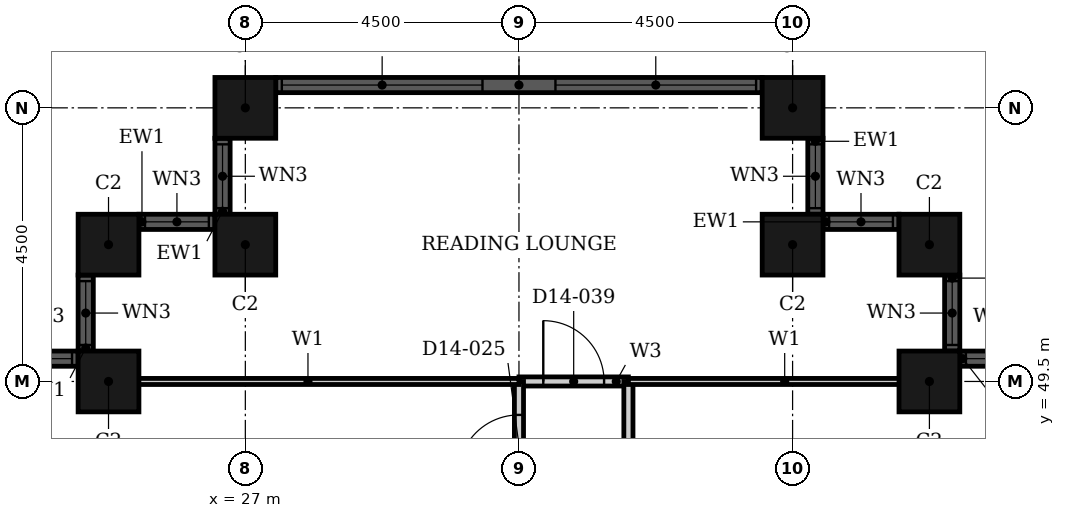
"""IFC4 building model, lengths in metres.
Left out: names, types, materials, properties, quantities, classifications, styles, units other than length and angle.
Written with IfcOpenShell. Run it as: python <this file> out.ifc"""

import sys

from ifc_helpers import new_model, si_unit, direction, frame, frame_2d, origin, origin_2d, place, context, subcontext, project, spatial, rectangle, hollow_rectangle, extrude, element, fill, save


model = new_model("IFC4")
c1 = context("Model", 3, precision=1e-05, world=origin(), true_north=direction((0.0, 1.0)))
c2 = subcontext(c1, "Body", "Model", "MODEL_VIEW")
j1 = project(units=[si_unit("LENGTHUNIT", "METRE"), si_unit("PLANEANGLEUNIT", "RADIAN")], contexts=[c1])
p1 = place(None, origin())
s1 = spatial("IfcSite", under=j1, at=p1, CompositionType="ELEMENT")
p2 = place(p1, origin())
s2 = spatial("IfcBuilding", under=s1, at=p2, CompositionType="ELEMENT")
p3 = place(p2, frame((0.0, 0.0, 63.6)))
s3 = spatial("IfcBuildingStorey", under=s2, at=p3, CompositionType="ELEMENT", Elevation=63.6)
for number, where, z_axis, x_axis in (
    (1, (38.25, 49.5, 0.0), (0.0, 0.0, 1.0), (1.0, 0.0, 0.0)),
    (2, (38.25, 51.75, 0.0), (0.0, 0.0, 1.0), (1.0, 0.0, 0.0)),
    (3, (36.0, 51.75, 0.0), (0.0, 0.0, 1.0), (1.0, 0.0, 0.0)),
    (4, (36.0, 54.0, 0.0), (0.0, 0.0, 1.0), (1.0, 0.0, 0.0)),
    (5, (27.0, 54.0, 0.0), (0.0, 0.0, 1.0), (1.0, 0.0, 0.0)),
    (6, (27.0, 51.75, 0.0), (0.0, 0.0, 1.0), (1.0, 0.0, 0.0)),
    (7, (24.75, 51.75, 0.0), (0.0, 0.0, 1.0), (1.0, 0.0, 0.0)),
    (8, (24.75, 49.5, 0.0), (0.0, 0.0, 1.0), (1.0, 0.0, 0.0)),
):
    element("IfcColumn", number, at=place(p3, frame(where, z_axis=z_axis, x_axis=x_axis)), inside=s3, PredefinedType="COLUMN", context=c2, shape_type="SweptSolid", body=[
        extrude(hollow_rectangle(XDim=1.0, YDim=1.0, WallThickness=0.032, at=origin_2d()), origin(), (0.0, 0.0, 1.0), 3.6),
    ])
p4 = place(p3, frame((40.0, 49.875, 0.0), z_axis=(0.0, 0.0, 1.0), x_axis=(-1.0, 0.0, 0.0)))
e9 = element("IfcWall", 9, at=p4, inside=s3, PredefinedType="SOLIDWALL", context=c2, shape_type="SweptSolid", body=[
    extrude(rectangle(XDim=1.25, YDim=0.25, at=frame_2d((0.625, 0.0))), origin(), (0.0, 0.0, 1.0), 3.6),
])
p5 = place(p4, frame((0.1, 0.0, 0.9)))
e10 = element("IfcOpeningElement", 10, at=p5, cuts=e9, PredefinedType="OPENING", context=c2, shape_type="SweptSolid", body=[
    extrude(rectangle(XDim=1.05, YDim=2.08, at=frame_2d((0.525, 1.04))), frame((0.0, 0.135, 0.0), z_axis=(0.0, -1.0, 0.0), x_axis=(1.0, 0.0, 0.0)), (0.0, 0.0, 1.0), 0.27),
])
p6 = place(p3, frame((38.625, 50.0, 0.0), z_axis=(0.0, 0.0, 1.0), x_axis=(0.0, 1.0, 0.0)))
e11 = element("IfcWall", 11, at=p6, inside=s3, PredefinedType="SOLIDWALL", context=c2, shape_type="SweptSolid", body=[
    extrude(rectangle(XDim=1.25, YDim=0.25, at=frame_2d((0.625, 0.0))), origin(), (0.0, 0.0, 1.0), 3.6),
])
p7 = place(p6, frame((0.1, 0.0, 0.9)))
e12 = element("IfcOpeningElement", 12, at=p7, cuts=e11, PredefinedType="OPENING", context=c2, shape_type="SweptSolid", body=[
    extrude(rectangle(XDim=1.05, YDim=2.08, at=frame_2d((0.525, 1.04))), frame((0.0, 0.135, 0.0), z_axis=(0.0, -1.0, 0.0), x_axis=(1.0, 0.0, 0.0)), (0.0, 0.0, 1.0), 0.27),
])
p8 = place(p3, frame((37.75, 52.125, 0.0), z_axis=(0.0, 0.0, 1.0), x_axis=(-1.0, 0.0, 0.0)))
e13 = element("IfcWall", 13, at=p8, inside=s3, PredefinedType="SOLIDWALL", context=c2, shape_type="SweptSolid", body=[
    extrude(rectangle(XDim=1.25, YDim=0.25, at=frame_2d((0.625, 0.0))), origin(), (0.0, 0.0, 1.0), 3.6),
])
p9 = place(p8, frame((0.1, 0.0, 0.9)))
e14 = element("IfcOpeningElement", 14, at=p9, cuts=e13, PredefinedType="OPENING", context=c2, shape_type="SweptSolid", body=[
    extrude(rectangle(XDim=1.05, YDim=2.08, at=frame_2d((0.525, 1.04))), frame((0.0, 0.135, 0.0), z_axis=(0.0, -1.0, 0.0), x_axis=(1.0, 0.0, 0.0)), (0.0, 0.0, 1.0), 0.27),
])
p10 = place(p3, frame((36.375, 52.25, 0.0), z_axis=(0.0, 0.0, 1.0), x_axis=(0.0, 1.0, 0.0)))
e15 = element("IfcWall", 15, at=p10, inside=s3, PredefinedType="SOLIDWALL", context=c2, shape_type="SweptSolid", body=[
    extrude(rectangle(XDim=1.25, YDim=0.25, at=frame_2d((0.625, 0.0))), origin(), (0.0, 0.0, 1.0), 3.6),
])
p11 = place(p10, frame((0.1, 0.0, 0.9)))
e16 = element("IfcOpeningElement", 16, at=p11, cuts=e15, PredefinedType="OPENING", context=c2, shape_type="SweptSolid", body=[
    extrude(rectangle(XDim=1.05, YDim=2.08, at=frame_2d((0.525, 1.04))), frame((0.0, 0.135, 0.0), z_axis=(0.0, -1.0, 0.0), x_axis=(1.0, 0.0, 0.0)), (0.0, 0.0, 1.0), 0.27),
])
p12 = place(p3, frame((35.5, 54.375, 0.0), z_axis=(0.0, 0.0, 1.0), x_axis=(-1.0, 0.0, 0.0)))
e17 = element("IfcWall", 17, at=p12, inside=s3, PredefinedType="SOLIDWALL", context=c2, shape_type="SweptSolid", body=[
    extrude(rectangle(XDim=8.0, YDim=0.25, at=frame_2d((4.0, 0.0))), origin(), (0.0, 0.0, 1.0), 3.6),
])
p13 = place(p12, frame((0.1, 0.0, 0.9)))
e18 = element("IfcOpeningElement", 18, at=p13, cuts=e17, PredefinedType="OPENING", context=c2, shape_type="SweptSolid", body=[
    extrude(rectangle(XDim=3.3, YDim=2.08, at=frame_2d((1.65, 1.04))), frame((0.0, 0.135, 0.0), z_axis=(0.0, -1.0, 0.0), x_axis=(1.0, 0.0, 0.0)), (0.0, 0.0, 1.0), 0.27),
])
p14 = place(p12, frame((4.6, 0.0, 0.9)))
e19 = element("IfcOpeningElement", 19, at=p14, cuts=e17, PredefinedType="OPENING", context=c2, shape_type="SweptSolid", body=[
    extrude(rectangle(XDim=3.3, YDim=2.08, at=frame_2d((1.65, 1.04))), frame((0.0, 0.135, 0.0), z_axis=(0.0, -1.0, 0.0), x_axis=(1.0, 0.0, 0.0)), (0.0, 0.0, 1.0), 0.27),
])
p15 = place(p3, frame((26.625, 53.5, 0.0), z_axis=(0.0, 0.0, 1.0), x_axis=(0.0, -1.0, 0.0)))
e20 = element("IfcWall", 20, at=p15, inside=s3, PredefinedType="SOLIDWALL", context=c2, shape_type="SweptSolid", body=[
    extrude(rectangle(XDim=1.25, YDim=0.25, at=frame_2d((0.625, 0.0))), origin(), (0.0, 0.0, 1.0), 3.6),
])
p16 = place(p15, frame((0.1, 0.0, 0.9)))
e21 = element("IfcOpeningElement", 21, at=p16, cuts=e20, PredefinedType="OPENING", context=c2, shape_type="SweptSolid", body=[
    extrude(rectangle(XDim=1.05, YDim=2.08, at=frame_2d((0.525, 1.04))), frame((0.0, 0.135, 0.0), z_axis=(0.0, -1.0, 0.0), x_axis=(1.0, 0.0, 0.0)), (0.0, 0.0, 1.0), 0.27),
])
p17 = place(p3, frame((26.5, 52.125, 0.0), z_axis=(0.0, 0.0, 1.0), x_axis=(-1.0, 0.0, 0.0)))
e22 = element("IfcWall", 22, at=p17, inside=s3, PredefinedType="SOLIDWALL", context=c2, shape_type="SweptSolid", body=[
    extrude(rectangle(XDim=1.25, YDim=0.25, at=frame_2d((0.625, 0.0))), origin(), (0.0, 0.0, 1.0), 3.6),
])
p18 = place(p17, frame((0.1, 0.0, 0.9)))
e23 = element("IfcOpeningElement", 23, at=p18, cuts=e22, PredefinedType="OPENING", context=c2, shape_type="SweptSolid", body=[
    extrude(rectangle(XDim=1.05, YDim=2.08, at=frame_2d((0.525, 1.04))), frame((0.0, 0.135, 0.0), z_axis=(0.0, -1.0, 0.0), x_axis=(1.0, 0.0, 0.0)), (0.0, 0.0, 1.0), 0.27),
])
p19 = place(p3, frame((24.375, 51.25, 0.0), z_axis=(0.0, 0.0, 1.0), x_axis=(0.0, -1.0, 0.0)))
e24 = element("IfcWall", 24, at=p19, inside=s3, PredefinedType="SOLIDWALL", context=c2, shape_type="SweptSolid", body=[
    extrude(rectangle(XDim=1.25, YDim=0.25, at=frame_2d((0.625, 0.0))), origin(), (0.0, 0.0, 1.0), 3.6),
])
p20 = place(p19, frame((0.1, 0.0, 0.9)))
e25 = element("IfcOpeningElement", 25, at=p20, cuts=e24, PredefinedType="OPENING", context=c2, shape_type="SweptSolid", body=[
    extrude(rectangle(XDim=1.05, YDim=2.08, at=frame_2d((0.525, 1.04))), frame((0.0, 0.135, 0.0), z_axis=(0.0, -1.0, 0.0), x_axis=(1.0, 0.0, 0.0)), (0.0, 0.0, 1.0), 0.27),
])
p21 = place(p3, frame((24.25, 49.875, 0.0), z_axis=(0.0, 0.0, 1.0), x_axis=(-1.0, 0.0, 0.0)))
e26 = element("IfcWall", 26, at=p21, inside=s3, PredefinedType="SOLIDWALL", context=c2, shape_type="SweptSolid", body=[
    extrude(rectangle(XDim=1.25, YDim=0.25, at=frame_2d((0.625, 0.0))), origin(), (0.0, 0.0, 1.0), 3.6),
])
p22 = place(p21, frame((0.1, 0.0, 0.9)))
e27 = element("IfcOpeningElement", 27, at=p22, cuts=e26, PredefinedType="OPENING", context=c2, shape_type="SweptSolid", body=[
    extrude(rectangle(XDim=1.05, YDim=2.08, at=frame_2d((0.525, 1.04))), frame((0.0, 0.135, 0.0), z_axis=(0.0, -1.0, 0.0), x_axis=(1.0, 0.0, 0.0)), (0.0, 0.0, 1.0), 0.27),
])
p23 = place(p3, frame((31.5, 49.5, 0.0), z_axis=(0.0, 0.0, 1.0), x_axis=(1.0, 0.0, 0.0)))
e28 = element("IfcWall", 28, at=p23, inside=s3, PredefinedType="PARTITIONING", context=c2, shape_type="SweptSolid", body=[
    extrude(rectangle(XDim=1.8, YDim=0.15, at=frame_2d((0.9, 0.0))), origin(), (0.0, 0.0, 1.0), 3.3),
])
p24 = place(p23, frame((0.4, 0.0, 0.0)))
e29 = element("IfcOpeningElement", 29, at=p24, cuts=e28, PredefinedType="OPENING", context=c2, shape_type="SweptSolid", body=[
    extrude(rectangle(XDim=1.0, YDim=2.1, at=frame_2d((0.5, 1.05))), frame((0.0, 0.085, 0.0), z_axis=(0.0, -1.0, 0.0), x_axis=(1.0, 0.0, 0.0)), (0.0, 0.0, 1.0), 0.17),
])
p25 = place(p3, frame((31.5, 40.5, 0.0), z_axis=(0.0, 0.0, 1.0), x_axis=(0.0, 1.0, 0.0)))
e30 = element("IfcWall", 30, at=p25, inside=s3, PredefinedType="PARTITIONING", context=c2, shape_type="SweptSolid", body=[
    extrude(rectangle(XDim=9.0, YDim=0.15, at=frame_2d((4.5, 0.0))), origin(), (0.0, 0.0, 1.0), 2.58),
])
p26 = place(p25, frame((2.95, 0.0, 0.0)))
e31 = element("IfcOpeningElement", 31, at=p26, cuts=e30, PredefinedType="OPENING", context=c2, shape_type="SweptSolid", body=[
    extrude(rectangle(XDim=1.0, YDim=2.1, at=frame_2d((0.5, 1.05))), frame((0.0, 0.085, 0.0), z_axis=(0.0, -1.0, 0.0), x_axis=(1.0, 0.0, 0.0)), (0.0, 0.0, 1.0), 0.17),
])
p27 = place(p25, frame((7.45, 0.0, 0.0)))
e32 = element("IfcOpeningElement", 32, at=p27, cuts=e30, PredefinedType="OPENING", context=c2, shape_type="SweptSolid", body=[
    extrude(rectangle(XDim=1.0, YDim=2.1, at=frame_2d((0.5, 1.05))), frame((0.0, 0.085, 0.0), z_axis=(0.0, -1.0, 0.0), x_axis=(1.0, 0.0, 0.0)), (0.0, 0.0, 1.0), 0.17),
])
p28 = place(p3, frame((33.3, 33.3, 0.0), z_axis=(0.0, 0.0, 1.0), x_axis=(0.0, 1.0, 0.0)))
e33 = element("IfcWall", 33, at=p28, inside=s3, PredefinedType="PARTITIONING", context=c2, shape_type="SweptSolid", body=[
    extrude(rectangle(XDim=16.2, YDim=0.15, at=frame_2d((8.1, 0.0))), origin(), (0.0, 0.0, 1.0), 3.3),
])
p29 = place(p28, frame((8.95, 0.0, 0.0)))
e34 = element("IfcOpeningElement", 34, at=p29, cuts=e33, PredefinedType="OPENING", context=c2, shape_type="SweptSolid", body=[
    extrude(rectangle(XDim=1.0, YDim=2.1, at=frame_2d((0.5, 1.05))), frame((0.0, 0.085, 0.0), z_axis=(0.0, -1.0, 0.0), x_axis=(1.0, 0.0, 0.0)), (0.0, 0.0, 1.0), 0.17),
])
p30 = place(p3, frame((24.56, 49.5, 0.0), z_axis=(0.0, 0.0, 1.0), x_axis=(1.0, 0.0, 0.0)))
e35 = element("IfcWall", 35, at=p30, inside=s3, PredefinedType="PARTITIONING", context=c2, shape_type="SweptSolid", body=[
    extrude(rectangle(XDim=6.94, YDim=0.1, at=frame_2d((3.47, 0.0))), origin(), (0.0, 0.0, 1.0), 3.3),
])
p31 = place(p3, frame((33.3, 49.5, 0.0), z_axis=(0.0, 0.0, 1.0), x_axis=(1.0, 0.0, 0.0)))
e36 = element("IfcWall", 36, at=p31, inside=s3, PredefinedType="PARTITIONING", context=c2, shape_type="SweptSolid", body=[
    extrude(rectangle(XDim=5.14, YDim=0.1, at=frame_2d((2.57, 0.0))), origin(), (0.0, 0.0, 1.0), 3.3),
])
p32 = place(p5, origin())
e37 = element("IfcWindow", 37, at=p32, inside=s3, PartitioningType="SINGLE_PANEL", PredefinedType="WINDOW", context=c2, shape_type="SweptSolid", body=[
    extrude(rectangle(XDim=1.05, YDim=2.08, at=frame_2d((0.525, 1.04))), frame((0.0, 0.03, 0.0), z_axis=(0.0, -1.0, 0.0), x_axis=(1.0, 0.0, 0.0)), (0.0, 0.0, 1.0), 0.06),
])
fill(e10, e37)
p33 = place(p7, origin())
e38 = element("IfcWindow", 38, at=p33, inside=s3, PartitioningType="SINGLE_PANEL", PredefinedType="WINDOW", context=c2, shape_type="SweptSolid", body=[
    extrude(rectangle(XDim=1.05, YDim=2.08, at=frame_2d((0.525, 1.04))), frame((0.0, 0.03, 0.0), z_axis=(0.0, -1.0, 0.0), x_axis=(1.0, 0.0, 0.0)), (0.0, 0.0, 1.0), 0.06),
])
fill(e12, e38)
p34 = place(p9, origin())
e39 = element("IfcWindow", 39, at=p34, inside=s3, PartitioningType="SINGLE_PANEL", PredefinedType="WINDOW", context=c2, shape_type="SweptSolid", body=[
    extrude(rectangle(XDim=1.05, YDim=2.08, at=frame_2d((0.525, 1.04))), frame((0.0, 0.03, 0.0), z_axis=(0.0, -1.0, 0.0), x_axis=(1.0, 0.0, 0.0)), (0.0, 0.0, 1.0), 0.06),
])
fill(e14, e39)
p35 = place(p11, origin())
e40 = element("IfcWindow", 40, at=p35, inside=s3, PartitioningType="SINGLE_PANEL", PredefinedType="WINDOW", context=c2, shape_type="SweptSolid", body=[
    extrude(rectangle(XDim=1.05, YDim=2.08, at=frame_2d((0.525, 1.04))), frame((0.0, 0.03, 0.0), z_axis=(0.0, -1.0, 0.0), x_axis=(1.0, 0.0, 0.0)), (0.0, 0.0, 1.0), 0.06),
])
fill(e16, e40)
p36 = place(p13, origin())
e41 = element("IfcWindow", 41, at=p36, inside=s3, PartitioningType="SINGLE_PANEL", PredefinedType="WINDOW", context=c2, shape_type="SweptSolid", body=[
    extrude(rectangle(XDim=3.3, YDim=2.08, at=frame_2d((1.65, 1.04))), frame((0.0, 0.03, 0.0), z_axis=(0.0, -1.0, 0.0), x_axis=(1.0, 0.0, 0.0)), (0.0, 0.0, 1.0), 0.06),
])
fill(e18, e41)
p37 = place(p14, origin())
e42 = element("IfcWindow", 42, at=p37, inside=s3, PartitioningType="SINGLE_PANEL", PredefinedType="WINDOW", context=c2, shape_type="SweptSolid", body=[
    extrude(rectangle(XDim=3.3, YDim=2.08, at=frame_2d((1.65, 1.04))), frame((0.0, 0.03, 0.0), z_axis=(0.0, -1.0, 0.0), x_axis=(1.0, 0.0, 0.0)), (0.0, 0.0, 1.0), 0.06),
])
fill(e19, e42)
p38 = place(p16, origin())
e43 = element("IfcWindow", 43, at=p38, inside=s3, PartitioningType="SINGLE_PANEL", PredefinedType="WINDOW", context=c2, shape_type="SweptSolid", body=[
    extrude(rectangle(XDim=1.05, YDim=2.08, at=frame_2d((0.525, 1.04))), frame((0.0, 0.03, 0.0), z_axis=(0.0, -1.0, 0.0), x_axis=(1.0, 0.0, 0.0)), (0.0, 0.0, 1.0), 0.06),
])
fill(e21, e43)
p39 = place(p18, origin())
e44 = element("IfcWindow", 44, at=p39, inside=s3, PartitioningType="SINGLE_PANEL", PredefinedType="WINDOW", context=c2, shape_type="SweptSolid", body=[
    extrude(rectangle(XDim=1.05, YDim=2.08, at=frame_2d((0.525, 1.04))), frame((0.0, 0.03, 0.0), z_axis=(0.0, -1.0, 0.0), x_axis=(1.0, 0.0, 0.0)), (0.0, 0.0, 1.0), 0.06),
])
fill(e23, e44)
p40 = place(p20, origin())
e45 = element("IfcWindow", 45, at=p40, inside=s3, PartitioningType="SINGLE_PANEL", PredefinedType="WINDOW", context=c2, shape_type="SweptSolid", body=[
    extrude(rectangle(XDim=1.05, YDim=2.08, at=frame_2d((0.525, 1.04))), frame((0.0, 0.03, 0.0), z_axis=(0.0, -1.0, 0.0), x_axis=(1.0, 0.0, 0.0)), (0.0, 0.0, 1.0), 0.06),
])
fill(e25, e45)
p41 = place(p22, origin())
e46 = element("IfcWindow", 46, at=p41, inside=s3, PartitioningType="SINGLE_PANEL", PredefinedType="WINDOW", context=c2, shape_type="SweptSolid", body=[
    extrude(rectangle(XDim=1.05, YDim=2.08, at=frame_2d((0.525, 1.04))), frame((0.0, 0.03, 0.0), z_axis=(0.0, -1.0, 0.0), x_axis=(1.0, 0.0, 0.0)), (0.0, 0.0, 1.0), 0.06),
])
fill(e27, e46)
p42 = place(p27, origin())
e47 = element("IfcDoor", 47, at=p42, inside=s3, OperationType="SINGLE_SWING_RIGHT", PredefinedType="DOOR", context=c2, shape_type="SweptSolid", body=[
    extrude(rectangle(XDim=1.0, YDim=2.1, at=frame_2d((0.5, 1.05))), frame((0.0, 0.025, 0.0), z_axis=(0.0, -1.0, 0.0), x_axis=(1.0, 0.0, 0.0)), (0.0, 0.0, 1.0), 0.05),
])
fill(e32, e47)
p43 = place(p24, origin())
e48 = element("IfcDoor", 48, at=p43, inside=s3, OperationType="SINGLE_SWING_LEFT", PredefinedType="DOOR", context=c2, shape_type="SweptSolid", body=[
    extrude(rectangle(XDim=1.0, YDim=2.1, at=frame_2d((0.5, 1.05))), frame((0.0, 0.025, 0.0), z_axis=(0.0, -1.0, 0.0), x_axis=(1.0, 0.0, 0.0)), (0.0, 0.0, 1.0), 0.05),
])
fill(e29, e48)
save(model, sys.argv[1])
